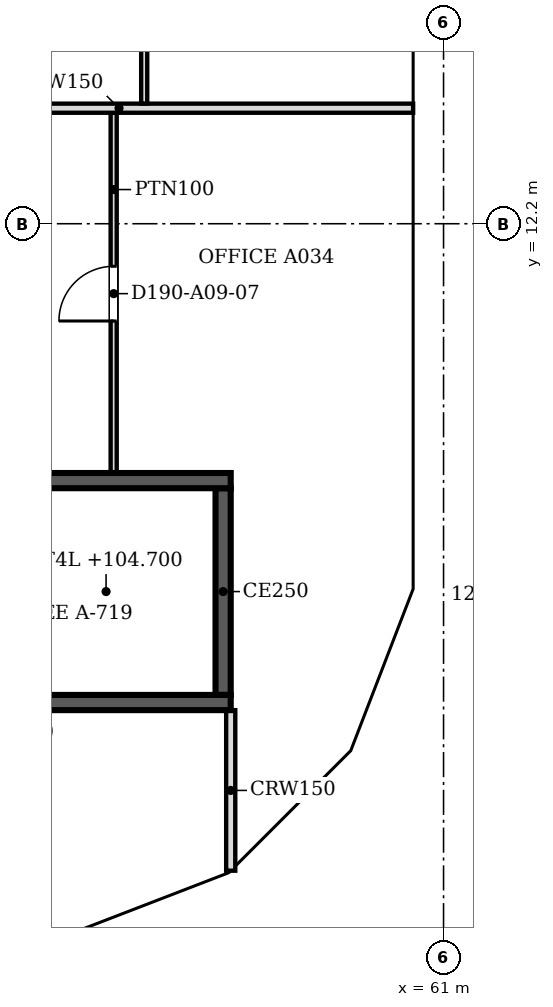
"""IFC4 building model, lengths in metres.
Left out: names, types, materials, properties, quantities, classifications, styles, units other than length and angle.
Written with IfcOpenShell. Run it as: python <this file> out.ifc"""

import sys

from ifc_helpers import new_model, si_unit, direction, frame, frame_2d, origin, place, context, subcontext, project, spatial, polyline, rectangle, outline, extrude, faceted_brep, source, transform, mapped, element, fill, save


model = new_model("IFC4")
c1 = context("Model", 3, precision=1e-05, world=origin(), true_north=direction((0.0, 1.0)))
c2 = subcontext(c1, "Body", "Model", "MODEL_VIEW")
j1 = project(units=[si_unit("LENGTHUNIT", "METRE"), si_unit("PLANEANGLEUNIT", "RADIAN")], contexts=[c1])
p1 = place(None, origin())
s1 = spatial("IfcSite", under=j1, at=p1, CompositionType="ELEMENT")
p2 = place(p1, origin())
s2 = spatial("IfcBuilding", under=s1, at=p2, CompositionType="ELEMENT")
p3 = place(p2, frame((0.0, 0.0, 102.8)))
s3 = spatial("IfcBuildingStorey", under=s2, at=p3, CompositionType="ELEMENT", Elevation=102.8)
m1 = source(origin(), c2, "Body", "Brep", [
    faceted_brep([(2.95, -0.25, 0.0), (3.003, -0.25, 0.068), (3.003, -0.25, 7.532), (2.95, -0.25, 7.6), (0.0, -0.25, 3.8), (0.047, 0.25, 3.86), (2.898, 0.25, 7.532), (2.898, 0.25, 0.068), (0.047, 0.25, 3.74), (2.95, 0.0, 0.0), (2.95, 0.0, 7.6), (0.0, 0.0, 3.8)], [[[0, 1, 2, 3, 4]], [[5, 6, 7, 8]], [[1, 0, 9]], [[10, 3, 2]], [[6, 5, 11, 4, 3, 10]], [[8, 7, 9, 0, 4, 11]], [[8, 11, 5]], [[1, 9, 7, 6, 10, 2]]]),
])
p4 = place(p3, frame((54.854, 0.25, -3.8), z_axis=(0.0, 0.0, 1.0), x_axis=(0.932970071518, 0.359953949349, 0.0)))
e1 = element("IfcWall", 1, at=p4, inside=s3, PredefinedType="SOLIDWALL", context=c2, shape_type="MappedRepresentation", body=[
    mapped(m1, transform((0.0, 0.0, 0.0), scale=1.0)),
])
m2 = source(origin(), c2, "Body", "SweptSolid", [
    extrude(outline(polyline([(2.75, 6.935), (0.316, 3.8), (2.75, 0.665), (2.75, 6.935)])), frame((0.0, 0.26, 0.0), z_axis=(0.0, -1.0, 0.0), x_axis=(1.0, 0.0, 0.0)), (0.0, 0.0, 1.0), 0.52),
])
p5 = place(p4, origin())
e2 = element("IfcOpeningElement", 2, at=p5, cuts=e1, PredefinedType="OPENING", context=c2, shape_type="MappedRepresentation", body=[
    mapped(m2, transform((0.0, 0.0, 0.0), scale=1.0)),
])
m3 = source(origin(), c2, "Body", "Brep", [
    faceted_brep([(0.053, -0.25, 0.0), (2.997, -0.25, 3.8), (0.053, -0.25, 7.6), (0.0, -0.25, 7.532), (0.0, -0.25, 0.068), (0.106, 0.25, 7.532), (2.944, 0.25, 3.868), (2.944, 0.25, 3.732), (0.106, 0.25, 0.068), (2.997, 0.0, 3.8), (0.053, 0.0, 0.0), (0.053, 0.0, 7.6)], [[[0, 1, 2, 3, 4]], [[5, 6, 7, 8]], [[8, 7, 9, 1, 0, 10]], [[6, 5, 11, 2, 1, 9]], [[3, 2, 11]], [[10, 0, 4]], [[8, 10, 4, 3, 11, 5]], [[9, 7, 6]]]),
])
p6 = place(p3, frame((57.569, 1.274, -3.8), z_axis=(0.0, 0.0, 1.0), x_axis=(0.707066050402, 0.707147509625, 0.0)))
e3 = element("IfcWall", 3, at=p6, inside=s3, PredefinedType="SOLIDWALL", context=c2, shape_type="MappedRepresentation", body=[
    mapped(m3, transform((0.0, 0.0, 0.0), scale=1.0)),
])
m4 = source(origin(), c2, "Body", "SweptSolid", [
    extrude(outline(polyline([(0.253, 0.666), (2.681, 3.8), (0.253, 6.934), (0.253, 0.666)])), frame((0.0, 0.26, 0.0), z_axis=(0.0, -1.0, 0.0), x_axis=(1.0, 0.0, 0.0)), (0.0, 0.0, 1.0), 0.52),
])
p7 = place(p6, origin())
e4 = element("IfcOpeningElement", 4, at=p7, cuts=e3, PredefinedType="OPENING", context=c2, shape_type="MappedRepresentation", body=[
    mapped(m4, transform((0.0, 0.0, 0.0), scale=1.0)),
])
m5 = source(origin(), c2, "Body", "Brep", [
    faceted_brep([(2.95, -0.25, 0.0), (2.997, -0.25, 0.059), (2.997, -0.25, 7.541), (2.95, -0.25, 7.6), (0.0, -0.25, 3.8), (0.053, 0.25, 3.868), (2.904, 0.25, 7.54), (2.904, 0.25, 0.06), (0.053, 0.25, 3.732), (2.95, 0.0, 0.0), (2.95, 0.0, 7.6), (0.0, 0.0, 3.8)], [[[0, 1, 2, 3, 4]], [[5, 6, 7, 8]], [[1, 0, 9]], [[10, 3, 2]], [[6, 5, 11, 4, 3, 10]], [[8, 7, 9, 0, 4, 11]], [[8, 11, 5]], [[1, 9, 7, 6, 10, 2]]]),
])
p8 = place(p3, frame((59.688, 3.394, -3.8), z_axis=(0.0, 0.0, 1.0), x_axis=(0.359972353723, 0.932962970624, 0.0)))
e5 = element("IfcWall", 5, at=p8, inside=s3, PredefinedType="SOLIDWALL", context=c2, shape_type="MappedRepresentation", body=[
    mapped(m5, transform((0.0, 0.0, 0.0), scale=1.0)),
])
p9 = place(p8, origin())
e6 = element("IfcOpeningElement", 6, at=p9, cuts=e5, PredefinedType="OPENING", context=c2, shape_type="MappedRepresentation", body=[
    mapped(m2, transform((0.0, 0.0, 0.0), scale=1.0)),
])
m6 = source(origin(), c2, "Body", "Brep", [
    faceted_brep([(0.047, -0.25, 0.0), (3.05, -0.25, 3.8), (0.047, -0.25, 7.6), (0.0, -0.25, 7.54), (0.0, -0.25, 0.06), (0.093, 0.25, 7.541), (3.05, 0.25, 3.8), (0.093, 0.25, 0.059), (0.047, 0.0, 0.0), (0.047, 0.0, 7.6)], [[[0, 1, 2, 3, 4]], [[5, 6, 7]], [[7, 6, 1, 0, 8]], [[6, 5, 9, 2, 1]], [[3, 2, 9]], [[8, 0, 4]], [[7, 8, 4, 3, 9, 5]]]),
])
p10 = place(p3, frame((60.75, 6.1, -3.8), z_axis=(0.0, 0.0, 1.0), x_axis=(0.0, 1.0, 0.0)))
e7 = element("IfcWall", 7, at=p10, inside=s3, PredefinedType="SOLIDWALL", context=c2, shape_type="MappedRepresentation", body=[
    mapped(m6, transform((0.0, 0.0, 0.0), scale=1.0)),
])
m7 = source(origin(), c2, "Body", "SweptSolid", [
    extrude(outline(polyline([(0.247, 0.656), (2.731, 3.8), (0.247, 6.944), (0.247, 0.656)])), frame((0.0, 0.26, 0.0), z_axis=(0.0, -1.0, 0.0), x_axis=(1.0, 0.0, 0.0)), (0.0, 0.0, 1.0), 0.52),
])
p11 = place(p10, origin())
e8 = element("IfcOpeningElement", 8, at=p11, cuts=e7, PredefinedType="OPENING", context=c2, shape_type="MappedRepresentation", body=[
    mapped(m7, transform((0.0, 0.0, 0.0), scale=1.0)),
])
m8 = source(origin(), c2, "Body", "SweptSolid", [
    extrude(outline(polyline([(3.05, 0.0), (6.1, 3.8), (3.05, 7.6), (0.0, 3.8), (3.05, 0.0)])), frame((0.0, 0.25, 0.0), z_axis=(0.0, -1.0, 0.0), x_axis=(1.0, 0.0, 0.0)), (0.0, 0.0, 1.0), 0.5),
])
p12 = place(p3, frame((60.75, 9.15, -3.8), z_axis=(0.0, 0.0, 1.0), x_axis=(0.0, 1.0, 0.0)))
e9 = element("IfcWall", 9, at=p12, inside=s3, PredefinedType="SOLIDWALL", context=c2, shape_type="MappedRepresentation", body=[
    mapped(m8, transform((0.0, 0.0, 0.0), scale=1.0)),
])
m9 = source(origin(), c2, "Body", "SweptSolid", [
    extrude(outline(polyline([(3.05, 0.399), (5.78, 3.8), (3.05, 7.201), (0.321, 3.8), (3.05, 0.399)])), frame((0.0, 0.26, 0.0), z_axis=(0.0, -1.0, 0.0), x_axis=(1.0, 0.0, 0.0)), (0.0, 0.0, 1.0), 0.52),
])
p13 = place(p12, origin())
e10 = element("IfcOpeningElement", 10, at=p13, cuts=e9, PredefinedType="OPENING", context=c2, shape_type="MappedRepresentation", body=[
    mapped(m9, transform((0.0, 0.0, 0.0), scale=1.0)),
])
m10 = source(origin(), c2, "Body", "Brep", [
    faceted_brep([(0.047, -0.25, 0.0), (2.997, -0.25, 3.8), (0.0, -0.25, 3.8), (0.0, -0.25, 0.059), (0.093, 0.25, 3.8), (2.944, 0.25, 3.8), (2.944, 0.25, 3.732), (0.093, 0.25, 0.06), (2.997, 0.0, 3.8), (0.047, 0.0, 0.0)], [[[0, 1, 2, 3]], [[4, 5, 6, 7]], [[7, 6, 8, 1, 0, 9]], [[5, 4, 2, 1, 8]], [[9, 0, 3]], [[7, 9, 3, 2, 4]], [[6, 5, 8]]]),
])
p14 = place(p3, frame((54.81, 0.233, 0.0), z_axis=(0.0, 0.0, 1.0), x_axis=(0.932990326376, 0.359901446078, 0.0)))
e11 = element("IfcWall", 11, at=p14, inside=s3, PredefinedType="SOLIDWALL", context=c2, shape_type="MappedRepresentation", body=[
    mapped(m10, transform((0.0, 0.0, 0.0), scale=1.0)),
])
m11 = source(origin(), c2, "Body", "SweptSolid", [
    extrude(outline(polyline([(0.247, 0.665), (2.487, 3.55), (0.247, 3.55), (0.247, 0.665)])), frame((0.0, 0.26, 0.0), z_axis=(0.0, -1.0, 0.0), x_axis=(1.0, 0.0, 0.0)), (0.0, 0.0, 1.0), 0.52),
])
p15 = place(p14, origin())
e12 = element("IfcOpeningElement", 12, at=p15, cuts=e11, PredefinedType="OPENING", context=c2, shape_type="MappedRepresentation", body=[
    mapped(m11, transform((0.0, 0.0, 0.0), scale=1.0)),
])
m12 = source(origin(), c2, "Body", "Brep", [
    faceted_brep([(2.944, -0.25, 0.0), (2.997, -0.25, 0.068), (2.997, -0.25, 3.8), (0.0, -0.25, 3.8), (0.053, 0.25, 3.8), (2.891, 0.25, 3.8), (2.891, 0.25, 0.068), (0.053, 0.25, 3.732), (2.944, 0.0, 0.0), (0.0, 0.0, 3.8)], [[[0, 1, 2, 3]], [[4, 5, 6, 7]], [[1, 0, 8]], [[5, 4, 9, 3, 2]], [[7, 6, 8, 0, 3, 9]], [[7, 9, 4]], [[1, 8, 6, 5, 2]]]),
])
p16 = place(p3, frame((57.606, 1.312, 0.0), z_axis=(0.0, 0.0, 1.0), x_axis=(0.707147509625, 0.707066050402, 0.0)))
e13 = element("IfcWall", 13, at=p16, inside=s3, PredefinedType="SOLIDWALL", context=c2, shape_type="MappedRepresentation", body=[
    mapped(m12, transform((0.0, 0.0, 0.0), scale=1.0)),
])
m13 = source(origin(), c2, "Body", "SweptSolid", [
    extrude(outline(polyline([(2.744, 3.55), (0.51, 3.55), (2.744, 0.666), (2.744, 3.55)])), frame((0.0, 0.26, 0.0), z_axis=(0.0, -1.0, 0.0), x_axis=(1.0, 0.0, 0.0)), (0.0, 0.0, 1.0), 0.52),
])
p17 = place(p16, origin())
e14 = element("IfcOpeningElement", 14, at=p17, cuts=e13, PredefinedType="OPENING", context=c2, shape_type="MappedRepresentation", body=[
    mapped(m13, transform((0.0, 0.0, 0.0), scale=1.0)),
])
m14 = source(origin(), c2, "Body", "Brep", [
    faceted_brep([(0.053, -0.25, 0.0), (3.003, -0.25, 3.8), (0.0, -0.25, 3.8), (0.0, -0.25, 0.068), (0.106, 0.25, 3.8), (2.957, 0.25, 3.8), (2.957, 0.25, 3.74), (0.106, 0.25, 0.068), (3.003, 0.0, 3.8), (0.053, 0.0, 0.0)], [[[0, 1, 2, 3]], [[4, 5, 6, 7]], [[7, 6, 8, 1, 0, 9]], [[5, 4, 2, 1, 8]], [[9, 0, 3]], [[7, 9, 3, 2, 4]], [[6, 5, 8]]]),
])
p18 = place(p3, frame((59.669, 3.344, 0.0), z_axis=(0.0, 0.0, 1.0), x_axis=(0.35992665181, 0.932980602862, 0.0)))
e15 = element("IfcWall", 15, at=p18, inside=s3, PredefinedType="SOLIDWALL", context=c2, shape_type="MappedRepresentation", body=[
    mapped(m14, transform((0.0, 0.0, 0.0), scale=1.0)),
])
m15 = source(origin(), c2, "Body", "SweptSolid", [
    extrude(outline(polyline([(0.253, 0.665), (2.493, 3.55), (0.253, 3.55), (0.253, 0.665)])), frame((0.0, 0.26, 0.0), z_axis=(0.0, -1.0, 0.0), x_axis=(1.0, 0.0, 0.0)), (0.0, 0.0, 1.0), 0.52),
])
p19 = place(p18, origin())
e16 = element("IfcOpeningElement", 16, at=p19, cuts=e15, PredefinedType="OPENING", context=c2, shape_type="MappedRepresentation", body=[
    mapped(m15, transform((0.0, 0.0, 0.0), scale=1.0)),
])
m16 = source(origin(), c2, "Body", "Brep", [
    faceted_brep([(3.003, -0.25, 0.0), (6.053, -0.25, 3.8), (0.0, -0.25, 3.8), (0.047, 0.25, 3.8), (6.053, 0.25, 3.8), (3.003, 0.25, 0.0), (0.047, 0.25, 3.741), (0.0, 0.0, 3.8)], [[[0, 1, 2]], [[3, 4, 5, 6]], [[5, 4, 1, 0]], [[4, 3, 7, 2, 1]], [[6, 5, 0, 2, 7]], [[6, 7, 3]]]),
])
p20 = place(p3, frame((60.75, 6.146, 0.0), z_axis=(0.0, 0.0, 1.0), x_axis=(0.0, 1.0, 0.0)))
e17 = element("IfcWall", 17, at=p20, inside=s3, PredefinedType="SOLIDWALL", context=c2, shape_type="MappedRepresentation", body=[
    mapped(m16, transform((0.0, 0.0, 0.0), scale=1.0)),
])
m17 = source(origin(), c2, "Body", "SweptSolid", [
    extrude(outline(polyline([(3.005, 0.401), (5.532, 3.55), (0.516, 3.55), (3.005, 0.401)])), frame((0.0, 0.26, 0.0), z_axis=(0.0, -1.0, 0.0), x_axis=(1.0, 0.0, 0.0)), (0.0, 0.0, 1.0), 0.52),
])
p21 = place(p20, origin())
e18 = element("IfcOpeningElement", 18, at=p21, cuts=e17, PredefinedType="OPENING", context=c2, shape_type="MappedRepresentation", body=[
    mapped(m17, transform((0.0, 0.0, 0.0), scale=1.0)),
])
m18 = source(origin(), c2, "Body", "SweptSolid", [
    extrude(outline(polyline([(3.05, 0.0), (6.1, 3.8), (0.0, 3.8), (3.05, 0.0)])), frame((0.0, 0.25, 0.0), z_axis=(0.0, -1.0, 0.0), x_axis=(1.0, 0.0, 0.0)), (0.0, 0.0, 1.0), 0.5),
])
p22 = place(p3, frame((60.75, 12.2, 0.0), z_axis=(0.0, 0.0, 1.0), x_axis=(0.0, 1.0, 0.0)))
e19 = element("IfcWall", 19, at=p22, inside=s3, PredefinedType="SOLIDWALL", context=c2, shape_type="MappedRepresentation", body=[
    mapped(m18, transform((0.0, 0.0, 0.0), scale=1.0)),
])
m19 = source(origin(), c2, "Body", "SweptSolid", [
    extrude(outline(polyline([(3.05, 0.399), (5.579, 3.55), (0.521, 3.55), (3.05, 0.399)])), frame((0.0, 0.26, 0.0), z_axis=(0.0, -1.0, 0.0), x_axis=(1.0, 0.0, 0.0)), (0.0, 0.0, 1.0), 0.52),
])
p23 = place(p22, origin())
e20 = element("IfcOpeningElement", 20, at=p23, cuts=e19, PredefinedType="OPENING", context=c2, shape_type="MappedRepresentation", body=[
    mapped(m19, transform((0.0, 0.0, 0.0), scale=1.0)),
])
p24 = place(p3, frame((57.5, 4.325, 0.0), z_axis=(0.0, 0.0, 1.0), x_axis=(-1.0, 0.0, 0.0)))
e21 = element("IfcWall", 21, at=p24, inside=s3, PredefinedType="SOLIDWALL", context=c2, shape_type="SweptSolid", body=[
    extrude(rectangle(XDim=8.5, YDim=0.25, at=frame_2d((4.25, 0.0))), origin(), (0.0, 0.0, 1.0), 3.8),
])
m20 = source(origin(), c2, "Body", "SweptSolid", [
    extrude(rectangle(XDim=1.2, YDim=2.1, at=frame_2d((0.6, 1.05))), frame((0.0, 0.135, 0.0), z_axis=(0.0, -1.0, 0.0), x_axis=(1.0, 0.0, 0.0)), (0.0, 0.0, 1.0), 0.27),
])
p25 = place(p24, frame((6.9, 0.0, 0.0)))
e22 = element("IfcOpeningElement", 22, at=p25, cuts=e21, PredefinedType="OPENING", context=c2, shape_type="MappedRepresentation", body=[
    mapped(m20, transform((0.0, 0.0, 0.0), scale=1.0)),
])
p26 = place(p3, frame((49.0, 7.975, 0.0), z_axis=(0.0, 0.0, 1.0), x_axis=(1.0, 0.0, 0.0)))
e23 = element("IfcWall", 23, at=p26, inside=s3, PredefinedType="SOLIDWALL", context=c2, shape_type="SweptSolid", body=[
    extrude(rectangle(XDim=8.5, YDim=0.25, at=frame_2d((4.25, 0.0))), origin(), (0.0, 0.0, 1.0), 3.8),
])
p27 = place(p3, frame((57.375, 7.85, 0.0), z_axis=(0.0, 0.0, 1.0), x_axis=(0.0, -1.0, 0.0)))
e24 = element("IfcWall", 24, at=p27, inside=s3, PredefinedType="SOLIDWALL", context=c2, shape_type="SweptSolid", body=[
    extrude(rectangle(XDim=3.4, YDim=0.25, at=frame_2d((1.7, 0.0))), origin(), (0.0, 0.0, 1.0), 3.8),
])
p28 = place(p3, frame((57.5, 1.559, 0.0), z_axis=(0.0, 0.0, 1.0), x_axis=(0.0, 1.0, 0.0)))
e25 = element("IfcWall", 25, at=p28, inside=s3, PredefinedType="PARTITIONING", context=c2, shape_type="SweptSolid", body=[
    extrude(rectangle(XDim=2.641, YDim=0.15, at=frame_2d((1.32, 0.0))), origin(), (0.0, 0.0, 1.0), 2.715),
])
p29 = place(p3, frame((55.575, 14.024, 0.0), z_axis=(0.0, 0.0, 1.0), x_axis=(0.0, -1.0, 0.0)))
e26 = element("IfcWall", 26, at=p29, inside=s3, PredefinedType="PARTITIONING", context=c2, shape_type="SweptSolid", body=[
    extrude(rectangle(XDim=5.924, YDim=0.1, at=frame_2d((2.962, 0.0))), origin(), (0.0, 0.0, 1.0), 2.715),
])
m21 = source(origin(), c2, "Body", "SweptSolid", [
    extrude(rectangle(XDim=0.9, YDim=2.1, at=frame_2d((0.45, 1.05))), frame((0.0, 0.06, 0.0), z_axis=(0.0, -1.0, 0.0), x_axis=(1.0, 0.0, 0.0)), (0.0, 0.0, 1.0), 0.12),
])
p30 = place(p29, frame((2.524, 0.0, 0.0)))
e27 = element("IfcOpeningElement", 27, at=p30, cuts=e26, PredefinedType="OPENING", context=c2, shape_type="MappedRepresentation", body=[
    mapped(m21, transform((0.0, 0.0, 0.0), scale=1.0)),
])
p31 = place(p3, frame((50.826, 14.1, 0.0), z_axis=(0.0, 0.0, 1.0), x_axis=(1.0, 0.0, 0.0)))
e28 = element("IfcWall", 28, at=p31, inside=s3, PredefinedType="PARTITIONING", context=c2, shape_type="SweptSolid", body=[
    extrude(rectangle(XDim=9.674, YDim=0.15, at=frame_2d((4.837, 0.0))), origin(), (0.0, 0.0, 1.0), 2.715),
])
p32 = place(p3, frame((56.077, 22.224, 0.0), z_axis=(0.0, 0.0, 1.0), x_axis=(0.0, -1.0, 0.0)))
e29 = element("IfcWall", 29, at=p32, inside=s3, PredefinedType="PARTITIONING", context=c2, shape_type="SweptSolid", body=[
    extrude(rectangle(XDim=8.048, YDim=0.1, at=frame_2d((4.024, 0.0))), origin(), (0.0, 0.0, 1.0), 2.715),
])
p33 = place(p32, frame((3.548, 0.0, 0.0)))
e30 = element("IfcOpeningElement", 30, at=p33, cuts=e29, PredefinedType="OPENING", context=c2, shape_type="MappedRepresentation", body=[
    mapped(m21, transform((0.0, 0.0, 0.0), scale=1.0)),
])
m22 = source(origin(), c2, "Body", "SweptSolid", [
    extrude(rectangle(XDim=0.9, YDim=2.1, at=frame_2d((0.45, 1.05))), frame((0.0, 0.025, 0.0), z_axis=(0.0, -1.0, 0.0), x_axis=(1.0, 0.0, 0.0)), (0.0, 0.0, 1.0), 0.05),
])
p34 = place(p30, origin())
e31 = element("IfcDoor", 31, at=p34, inside=s3, OperationType="SINGLE_SWING_RIGHT", PredefinedType="DOOR", context=c2, shape_type="MappedRepresentation", body=[
    mapped(m22, transform((0.0, 0.0, 0.0), scale=1.0)),
])
fill(e27, e31)
save(model, sys.argv[1])
